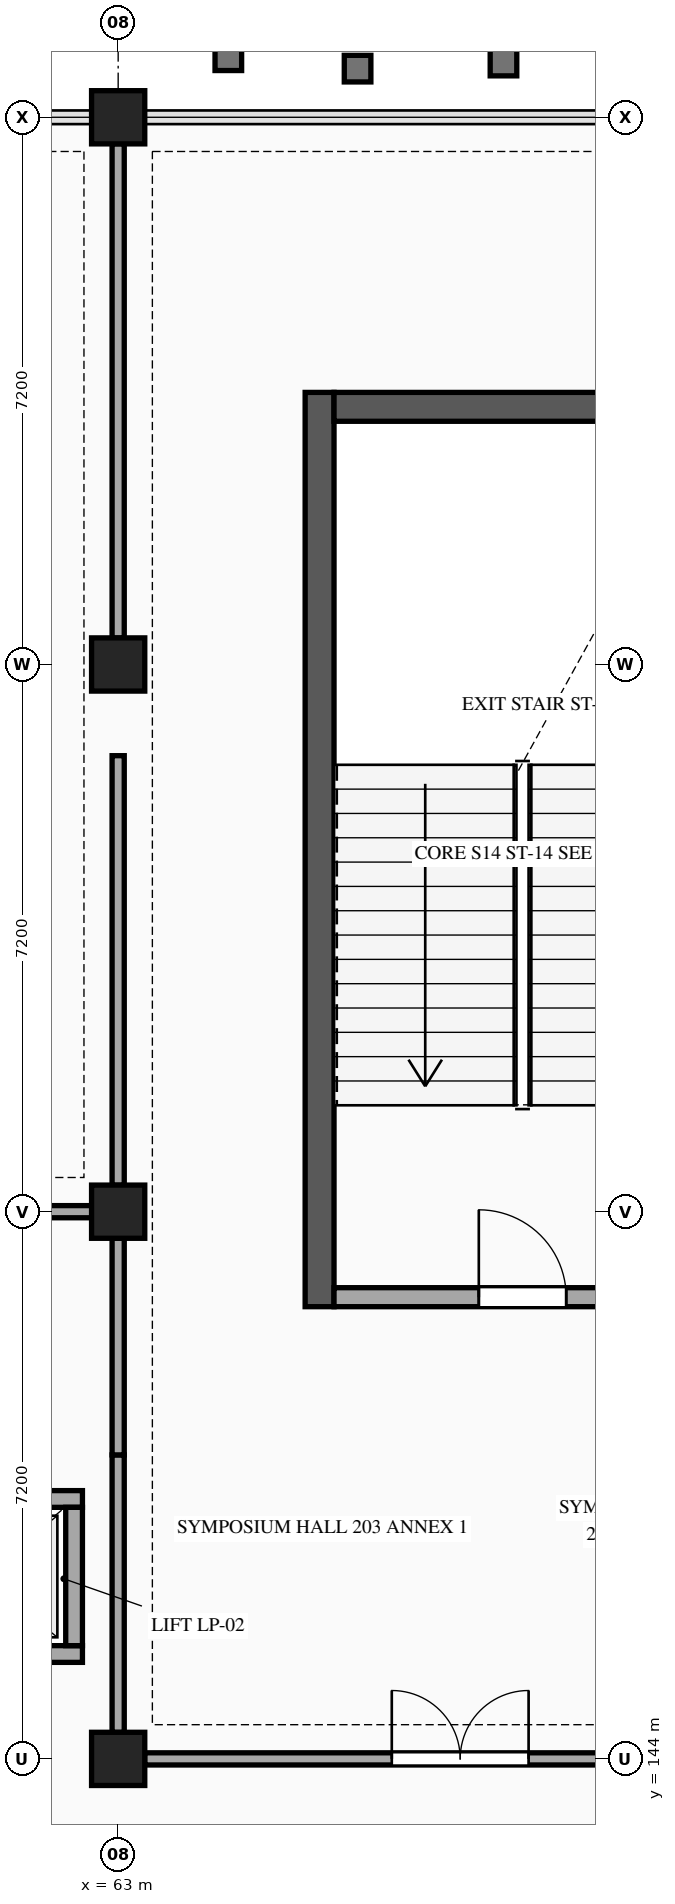
"""IFC4 building model, lengths in metres.
Left out: names, types, materials, properties, quantities, classifications, styles, units other than length and angle.
Written with IfcOpenShell. Run it as: python <this file> out.ifc"""

import sys

from ifc_helpers import new_model, si_unit, direction, frame, frame_2d, origin, origin_2d, place, context, subcontext, project, spatial, rectangle, extrude, element, fill, save


model = new_model("IFC4")
c1 = context("Model", 3, precision=1e-05, world=origin(), true_north=direction((0.0, 1.0)))
c2 = subcontext(c1, "Body", "Model", "MODEL_VIEW")
j1 = project(units=[si_unit("LENGTHUNIT", "METRE"), si_unit("PLANEANGLEUNIT", "RADIAN")], contexts=[c1])
p1 = place(None, origin())
s1 = spatial("IfcSite", under=j1, at=p1, CompositionType="ELEMENT")
p2 = place(p1, origin())
s2 = spatial("IfcBuilding", under=s1, at=p2, CompositionType="ELEMENT")
p3 = place(p2, frame((0.0, 0.0, 10.8)))
s3 = spatial("IfcBuildingStorey", under=s2, at=p3, CompositionType="ELEMENT", Elevation=10.8)
for number, where, z_axis, x_axis in (
    (1, (63.0, 144.0, 0.0), (0.0, 0.0, 1.0), (1.0, 0.0, 0.0)),
    (2, (63.0, 151.2, 0.0), (0.0, 0.0, 1.0), (1.0, 0.0, 0.0)),
    (3, (63.0, 158.4, 0.0), (0.0, 0.0, 1.0), (1.0, 0.0, 0.0)),
    (4, (63.0, 165.6, 0.0), (0.0, 0.0, 1.0), (1.0, 0.0, 0.0)),
):
    element("IfcColumn", number, at=place(p3, frame(where, z_axis=z_axis, x_axis=x_axis)), inside=s3, PredefinedType="COLUMN", context=c2, shape_type="SweptSolid", body=[
        extrude(rectangle(XDim=0.7, YDim=0.7, at=origin_2d()), origin(), (0.0, 0.0, 1.0), 4.5),
    ])
p4 = place(p3, frame((65.65, 149.95, 0.0), z_axis=(0.0, 0.0, 1.0), x_axis=(0.0, 1.0, 0.0)))
e5 = element("IfcWall", 5, at=p4, inside=s3, PredefinedType="SHEAR", context=c2, shape_type="SweptSolid", body=[
    extrude(rectangle(XDim=12.03, YDim=0.38, at=frame_2d((6.015, 0.0))), origin(), (0.0, 0.0, 1.0), 4.25),
])
p5 = place(p3, frame((65.84, 161.79, 0.0), z_axis=(0.0, 0.0, 1.0), x_axis=(1.0, 0.0, 0.0)))
e6 = element("IfcWall", 6, at=p5, inside=s3, PredefinedType="SHEAR", context=c2, shape_type="SweptSolid", body=[
    extrude(rectangle(XDim=4.96, YDim=0.38, at=frame_2d((2.48, 0.0))), origin(), (0.0, 0.0, 1.0), 4.25),
])
p6 = place(p3, frame((59.87, 145.38, 0.0), z_axis=(0.0, 0.0, 1.0), x_axis=(1.0, 0.0, 0.0)))
e7 = element("IfcWall", 7, at=p6, inside=s3, PredefinedType="STANDARD", context=c2, shape_type="SweptSolid", body=[
    extrude(rectangle(XDim=2.66, YDim=0.22, at=frame_2d((1.33, 0.0))), origin(), (0.0, 0.0, 1.0), 4.22),
])
p7 = place(p6, frame((0.73, 0.0, 0.0)))
e8 = element("IfcOpeningElement", 8, at=p7, cuts=e7, PredefinedType="OPENING", context=c2, shape_type="SweptSolid", body=[
    extrude(rectangle(XDim=1.2, YDim=2.2, at=frame_2d((0.6, 1.1))), frame((0.0, 0.12, 0.0), z_axis=(0.0, -1.0, 0.0), x_axis=(1.0, 0.0, 0.0)), (0.0, 0.0, 1.0), 0.24),
])
p8 = place(p3, frame((62.53, 147.42, 0.0), z_axis=(0.0, 0.0, 1.0), x_axis=(-1.0, 0.0, 0.0)))
e9 = element("IfcWall", 9, at=p8, inside=s3, PredefinedType="STANDARD", context=c2, shape_type="SweptSolid", body=[
    extrude(rectangle(XDim=2.66, YDim=0.22, at=frame_2d((1.33, 0.0))), origin(), (0.0, 0.0, 1.0), 4.22),
])
p9 = place(p3, frame((62.42, 145.49, 0.0), z_axis=(0.0, 0.0, 1.0), x_axis=(0.0, 1.0, 0.0)))
e10 = element("IfcWall", 10, at=p9, inside=s3, PredefinedType="STANDARD", context=c2, shape_type="SweptSolid", body=[
    extrude(rectangle(XDim=1.82, YDim=0.22, at=frame_2d((0.91, 0.0))), origin(), (0.0, 0.0, 1.0), 4.22),
])
p10 = place(p3, frame((65.84, 150.075, 0.0), z_axis=(0.0, 0.0, 1.0), x_axis=(1.0, 0.0, 0.0)))
e11 = element("IfcWall", 11, at=p10, inside=s3, PredefinedType="STANDARD", context=c2, shape_type="SweptSolid", body=[
    extrude(rectangle(XDim=4.96, YDim=0.25, at=frame_2d((2.48, 0.0))), origin(), (0.0, 0.0, 1.0), 4.22),
])
p11 = place(p10, frame((1.905, 0.0, 0.0)))
e12 = element("IfcOpeningElement", 12, at=p11, cuts=e11, PredefinedType="OPENING", context=c2, shape_type="SweptSolid", body=[
    extrude(rectangle(XDim=1.15, YDim=2.2, at=frame_2d((0.575, 1.1))), frame((0.0, 0.135, 0.0), z_axis=(0.0, -1.0, 0.0), x_axis=(1.0, 0.0, 0.0)), (0.0, 0.0, 1.0), 0.27),
])
p12 = place(p3, frame((63.348, 144.0, 0.0), z_axis=(0.0, 0.0, 1.0), x_axis=(1.0, 0.0, 0.0)))
e13 = element("IfcWall", 13, at=p12, inside=s3, PredefinedType="PARTITIONING", context=c2, shape_type="SweptSolid", body=[
    extrude(rectangle(XDim=8.304, YDim=0.16, at=frame_2d((4.152, 0.0))), origin(), (0.0, 0.0, 1.0), 3.628),
])
p13 = place(p12, frame((3.252, 0.0, 0.0)))
e14 = element("IfcOpeningElement", 14, at=p13, cuts=e13, PredefinedType="OPENING", context=c2, shape_type="SweptSolid", body=[
    extrude(rectangle(XDim=1.8, YDim=2.25, at=frame_2d((0.9, 1.125))), frame((0.0, 0.09, 0.0), z_axis=(0.0, -1.0, 0.0), x_axis=(1.0, 0.0, 0.0)), (0.0, 0.0, 1.0), 0.18),
])
p14 = place(p3, frame((54.348, 151.2, 0.0), z_axis=(0.0, 0.0, 1.0), x_axis=(1.0, 0.0, 0.0)))
e15 = element("IfcWall", 15, at=p14, inside=s3, PredefinedType="PARTITIONING", context=c2, shape_type="SweptSolid", body=[
    extrude(rectangle(XDim=8.304, YDim=0.16, at=frame_2d((4.152, 0.0))), origin(), (0.0, 0.0, 1.0), 3.628),
])
p15 = place(p14, frame((3.252, 0.0, 0.0)))
e16 = element("IfcOpeningElement", 16, at=p15, cuts=e15, PredefinedType="OPENING", context=c2, shape_type="SweptSolid", body=[
    extrude(rectangle(XDim=1.8, YDim=2.25, at=frame_2d((0.9, 1.125))), frame((0.0, 0.09, 0.0), z_axis=(0.0, -1.0, 0.0), x_axis=(1.0, 0.0, 0.0)), (0.0, 0.0, 1.0), 0.18),
])
p16 = place(p3, frame((63.0, 144.348, 0.0), z_axis=(0.0, 0.0, 1.0), x_axis=(0.0, 1.0, 0.0)))
e17 = element("IfcWall", 17, at=p16, inside=s3, PredefinedType="PARTITIONING", context=c2, shape_type="SweptSolid", body=[
    extrude(rectangle(XDim=3.652, YDim=0.16, at=frame_2d((1.826, 0.0))), origin(), (0.0, 0.0, 1.0), 3.628),
])
p17 = place(p3, frame((63.0, 148.0, 0.0), z_axis=(0.0, 0.0, 1.0), x_axis=(0.0, 1.0, 0.0)))
e18 = element("IfcWall", 18, at=p17, inside=s3, PredefinedType="PARTITIONING", context=c2, shape_type="SweptSolid", body=[
    extrude(rectangle(XDim=2.852, YDim=0.16, at=frame_2d((1.426, 0.0))), origin(), (0.0, 0.0, 1.0), 3.628),
])
p18 = place(p3, frame((63.0, 151.548, 0.0), z_axis=(0.0, 0.0, 1.0), x_axis=(0.0, 1.0, 0.0)))
e19 = element("IfcWall", 19, at=p18, inside=s3, PredefinedType="PARTITIONING", context=c2, shape_type="SweptSolid", body=[
    extrude(rectangle(XDim=5.652, YDim=0.16, at=frame_2d((2.826, 0.0))), origin(), (0.0, 0.0, 1.0), 3.628),
])
p19 = place(p3, frame((63.0, 158.748, 0.0), z_axis=(0.0, 0.0, 1.0), x_axis=(0.0, 1.0, 0.0)))
e20 = element("IfcWall", 20, at=p19, inside=s3, PredefinedType="PARTITIONING", context=c2, shape_type="SweptSolid", body=[
    extrude(rectangle(XDim=6.504, YDim=0.16, at=frame_2d((3.252, 0.0))), origin(), (0.0, 0.0, 1.0), 3.628),
])
p20 = place(p11, origin())
e21 = element("IfcDoor", 21, at=p20, inside=s3, OperationType="SINGLE_SWING_LEFT", PredefinedType="DOOR", context=c2, shape_type="SweptSolid", body=[
    extrude(rectangle(XDim=1.15, YDim=2.2, at=frame_2d((0.575, 1.1))), frame((0.0, 0.025, 0.0), z_axis=(0.0, -1.0, 0.0), x_axis=(1.0, 0.0, 0.0)), (0.0, 0.0, 1.0), 0.05),
])
fill(e12, e21)
p21 = place(p13, origin())
e22 = element("IfcDoor", 22, at=p21, inside=s3, OperationType="DOUBLE_DOOR_SINGLE_SWING", PredefinedType="DOOR", context=c2, shape_type="SweptSolid", body=[
    extrude(rectangle(XDim=1.8, YDim=2.25, at=frame_2d((0.9, 1.125))), frame((0.0, 0.025, 0.0), z_axis=(0.0, -1.0, 0.0), x_axis=(1.0, 0.0, 0.0)), (0.0, 0.0, 1.0), 0.05),
])
fill(e14, e22)
save(model, sys.argv[1])
